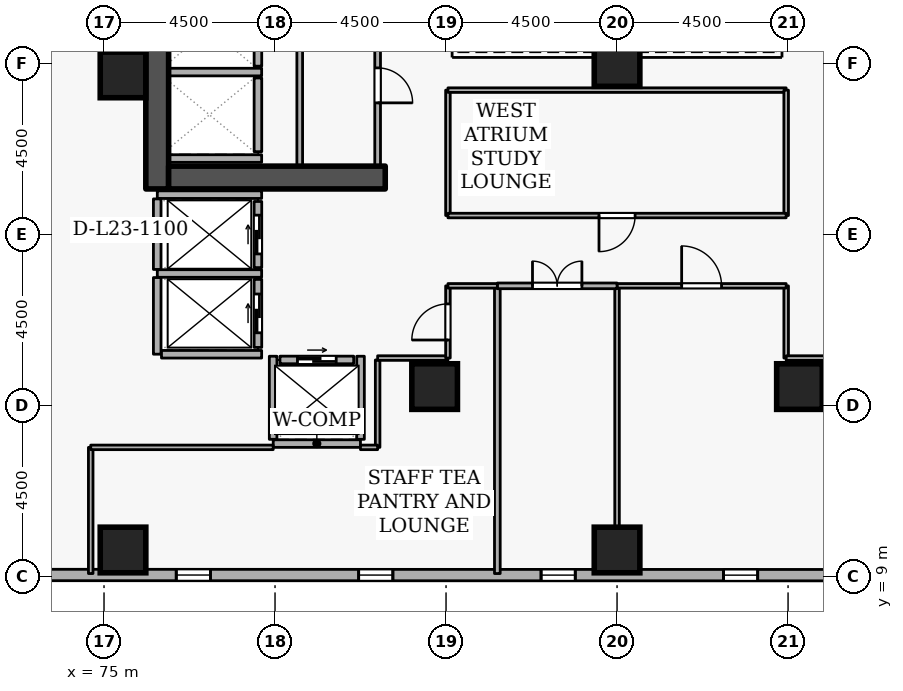
"""IFC4 building model, lengths in metres.
Left out: names, types, materials, properties, quantities, classifications, styles, units other than length and angle.
Written with IfcOpenShell. Run it as: python <this file> out.ifc"""

import sys

from ifc_helpers import new_model, si_unit, direction, frame, frame_2d, origin, origin_2d, place, context, subcontext, project, spatial, rectangle, extrude, element, fill, save


model = new_model("IFC4")
c1 = context("Model", 3, precision=1e-05, world=origin(), true_north=direction((0.0, 1.0)))
c2 = subcontext(c1, "Body", "Model", "MODEL_VIEW")
j1 = project(units=[si_unit("LENGTHUNIT", "METRE"), si_unit("PLANEANGLEUNIT", "RADIAN")], contexts=[c1])
p1 = place(None, origin())
s1 = spatial("IfcSite", under=j1, at=p1, CompositionType="ELEMENT")
p2 = place(p1, origin())
s2 = spatial("IfcBuilding", under=s1, at=p2, CompositionType="ELEMENT")
p3 = place(p2, frame((0.0, 0.0, 90.9)))
s3 = spatial("IfcBuildingStorey", under=s2, at=p3, CompositionType="ELEMENT", Elevation=90.9)
p4 = place(p3, frame((76.4, 19.2, 0.0), z_axis=(0.0, 0.0, 1.0), x_axis=(0.0, 1.0, 0.0)))
e1 = element("IfcWall", 1, at=p4, inside=s3, PredefinedType="SHEAR", context=c2, shape_type="SweptSolid", body=[
    extrude(rectangle(XDim=15.6, YDim=0.6, at=frame_2d((7.8, 0.0))), origin(), (0.0, 0.0, 1.0), 3.6),
])
p5 = place(p3, frame((76.7, 19.5, 0.0), z_axis=(0.0, 0.0, 1.0), x_axis=(1.0, 0.0, 0.0)))
e2 = element("IfcWall", 2, at=p5, inside=s3, PredefinedType="SHEAR", context=c2, shape_type="SweptSolid", body=[
    extrude(rectangle(XDim=5.7, YDim=0.6, at=frame_2d((2.85, 0.0))), origin(), (0.0, 0.0, 1.0), 3.6),
])
for number, where, z_axis, x_axis in (
    (3, (88.5, 9.7, 0.0), (0.0, 0.0, 1.0), (1.0, 0.0, 0.0)),
    (4, (75.5, 9.7, 0.0), (0.0, 0.0, 1.0), (1.0, 0.0, 0.0)),
    (5, (93.3, 14.0, 0.0), (0.0, 0.0, 1.0), (1.0, 0.0, 0.0)),
    (6, (83.7, 14.0, 0.0), (0.0, 0.0, 1.0), (1.0, 0.0, 0.0)),
    (7, (75.5, 22.2, 0.0), (0.0, 0.0, 1.0), (1.0, 0.0, 0.0)),
    (8, (88.5, 22.5, 0.0), (0.0, 0.0, 1.0), (1.0, 0.0, 0.0)),
):
    element("IfcColumn", number, at=place(p3, frame(where, z_axis=z_axis, x_axis=x_axis)), inside=s3, PredefinedType="COLUMN", context=c2, shape_type="SweptSolid", body=[
        extrude(rectangle(XDim=1.2, YDim=1.2, at=origin_2d()), origin(), (0.0, 0.0, 1.0), 3.6),
    ])
p6 = place(p3, frame((69.401, 9.043, 0.0), z_axis=(0.0, 0.0, 1.0), x_axis=(0.99999997744, -0.000212414941, 0.0)))
e9 = element("IfcWall", 9, at=p6, inside=s3, PredefinedType="STANDARD", context=c2, shape_type="SweptSolid", body=[
    extrude(rectangle(XDim=34.481, YDim=0.3, at=frame_2d((17.24, 0.0))), origin(), (0.0, 0.0, 1.0), 2.7),
])
p7 = place(p6, frame((7.5, 0.0, 0.72)))
e10 = element("IfcOpeningElement", 10, at=p7, cuts=e9, PredefinedType="OPENING", context=c2, shape_type="SweptSolid", body=[
    extrude(rectangle(XDim=0.9, YDim=1.75, at=frame_2d((0.45, 0.875))), frame((0.0, 0.16, 0.0), z_axis=(0.0, -1.0, 0.0), x_axis=(1.0, 0.0, 0.0)), (0.0, 0.0, 1.0), 0.32),
])
p8 = place(p6, frame((12.3, 0.0, 0.72)))
e11 = element("IfcOpeningElement", 11, at=p8, cuts=e9, PredefinedType="OPENING", context=c2, shape_type="SweptSolid", body=[
    extrude(rectangle(XDim=0.9, YDim=1.75, at=frame_2d((0.45, 0.875))), frame((0.0, 0.16, 0.0), z_axis=(0.0, -1.0, 0.0), x_axis=(1.0, 0.0, 0.0)), (0.0, 0.0, 1.0), 0.32),
])
p9 = place(p6, frame((17.1, 0.0, 0.72)))
e12 = element("IfcOpeningElement", 12, at=p9, cuts=e9, PredefinedType="OPENING", context=c2, shape_type="SweptSolid", body=[
    extrude(rectangle(XDim=0.9, YDim=1.75, at=frame_2d((0.45, 0.875))), frame((0.0, 0.16, 0.0), z_axis=(0.0, -1.0, 0.0), x_axis=(1.0, 0.0, 0.0)), (0.0, 0.0, 1.0), 0.32),
])
p10 = place(p6, frame((21.9, 0.0, 0.72)))
e13 = element("IfcOpeningElement", 13, at=p10, cuts=e9, PredefinedType="OPENING", context=c2, shape_type="SweptSolid", body=[
    extrude(rectangle(XDim=0.9, YDim=1.75, at=frame_2d((0.45, 0.875))), frame((0.0, 0.16, 0.0), z_axis=(0.0, -1.0, 0.0), x_axis=(1.0, 0.0, 0.0)), (0.0, 0.0, 1.0), 0.32),
])
p11 = place(p6, frame((26.7, 0.0, 0.72)))
e14 = element("IfcOpeningElement", 14, at=p11, cuts=e9, PredefinedType="OPENING", context=c2, shape_type="SweptSolid", body=[
    extrude(rectangle(XDim=0.9, YDim=1.75, at=frame_2d((0.45, 0.875))), frame((0.0, 0.16, 0.0), z_axis=(0.0, -1.0, 0.0), x_axis=(1.0, 0.0, 0.0)), (0.0, 0.0, 1.0), 0.32),
])
p12 = place(p3, frame((79.05, 22.43, 0.0), z_axis=(0.0, 0.0, 1.0), x_axis=(0.0, 1.0, 0.0)))
e15 = element("IfcWall", 15, at=p12, inside=s3, PredefinedType="STANDARD", context=c2, shape_type="SweptSolid", body=[
    extrude(rectangle(XDim=1.99, YDim=0.2, at=frame_2d((0.995, 0.0))), origin(), (0.0, 0.0, 1.0), 3.34),
])
p13 = place(p3, frame((79.05, 20.18, 0.0), z_axis=(0.0, 0.0, 1.0), x_axis=(0.0, 1.0, 0.0)))
e16 = element("IfcWall", 16, at=p13, inside=s3, PredefinedType="STANDARD", context=c2, shape_type="SweptSolid", body=[
    extrude(rectangle(XDim=1.94, YDim=0.2, at=frame_2d((0.97, 0.0))), origin(), (0.0, 0.0, 1.0), 3.34),
])
p14 = place(p3, frame((79.05, 17.13, 0.0), z_axis=(0.0, 0.0, 1.0), x_axis=(0.0, 1.0, 0.0)))
e17 = element("IfcWall", 17, at=p14, inside=s3, PredefinedType="STANDARD", context=c2, shape_type="SweptSolid", body=[
    extrude(rectangle(XDim=1.74, YDim=0.2, at=frame_2d((0.87, 0.0))), origin(), (0.0, 0.0, 1.0), 3.34),
])
p15 = place(p14, frame((0.36, 0.0, 0.0)))
e18 = element("IfcOpeningElement", 18, at=p15, cuts=e17, PredefinedType="OPENING", context=c2, shape_type="SweptSolid", body=[
    extrude(rectangle(XDim=1.02, YDim=2.06, at=frame_2d((0.51, 1.03))), frame((0.0, 0.11, 0.0), z_axis=(0.0, -1.0, 0.0), x_axis=(1.0, 0.0, 0.0)), (0.0, 0.0, 1.0), 0.22),
])
p16 = place(p3, frame((79.05, 15.03, 0.0), z_axis=(0.0, 0.0, 1.0), x_axis=(0.0, 1.0, 0.0)))
e19 = element("IfcWall", 19, at=p16, inside=s3, PredefinedType="STANDARD", context=c2, shape_type="SweptSolid", body=[
    extrude(rectangle(XDim=1.79, YDim=0.2, at=frame_2d((0.895, 0.0))), origin(), (0.0, 0.0, 1.0), 3.34),
])
p17 = place(p16, frame((0.385, 0.0, 0.0)))
e20 = element("IfcOpeningElement", 20, at=p17, cuts=e19, PredefinedType="OPENING", context=c2, shape_type="SweptSolid", body=[
    extrude(rectangle(XDim=1.02, YDim=2.06, at=frame_2d((0.51, 1.03))), frame((0.0, 0.11, 0.0), z_axis=(0.0, -1.0, 0.0), x_axis=(1.0, 0.0, 0.0)), (0.0, 0.0, 1.0), 0.22),
])
p18 = place(p3, frame((79.63, 14.7, 0.0), z_axis=(0.0, 0.0, 1.0), x_axis=(1.0, 0.0, 0.0)))
e21 = element("IfcWall", 21, at=p18, inside=s3, PredefinedType="STANDARD", context=c2, shape_type="SweptSolid", body=[
    extrude(rectangle(XDim=1.94, YDim=0.2, at=frame_2d((0.97, 0.0))), origin(), (0.0, 0.0, 1.0), 3.34),
])
p19 = place(p18, frame((0.46, 0.0, 0.0)))
e22 = element("IfcOpeningElement", 22, at=p19, cuts=e21, PredefinedType="OPENING", context=c2, shape_type="SweptSolid", body=[
    extrude(rectangle(XDim=1.02, YDim=2.06, at=frame_2d((0.51, 1.03))), frame((0.0, 0.11, 0.0), z_axis=(0.0, -1.0, 0.0), x_axis=(1.0, 0.0, 0.0)), (0.0, 0.0, 1.0), 0.22),
])
for number, where, z_axis, x_axis in (
    (23, (76.712, 22.275, 0.0), (0.0, 0.0, 1.0), (1.0, 0.0, 0.0)),
    (24, (76.712, 20.0, 0.0), (0.0, 0.0, 1.0), (1.0, 0.0, 0.0)),
):
    element("IfcWall", number, at=place(p3, frame(where, z_axis=z_axis, x_axis=x_axis)), inside=s3, PredefinedType="STANDARD", context=c2, shape_type="SweptSolid", body=[
        extrude(rectangle(XDim=2.436, YDim=0.2, at=frame_2d((1.218, 0.0))), origin(), (0.0, 0.0, 1.0), 3.34),
    ])
p20 = place(p3, frame((76.402, 19.05, 0.0), z_axis=(0.0, 0.0, 1.0), x_axis=(1.0, 0.0, 0.0)))
e25 = element("IfcWall", 25, at=p20, inside=s3, PredefinedType="STANDARD", context=c2, shape_type="SweptSolid", body=[
    extrude(rectangle(XDim=2.746, YDim=0.2, at=frame_2d((1.373, 0.0))), origin(), (0.0, 0.0, 1.0), 2.545),
])
p21 = place(p3, frame((76.402, 16.975, 0.0), z_axis=(0.0, 0.0, 1.0), x_axis=(1.0, 0.0, 0.0)))
e26 = element("IfcWall", 26, at=p21, inside=s3, PredefinedType="STANDARD", context=c2, shape_type="SweptSolid", body=[
    extrude(rectangle(XDim=2.746, YDim=0.2, at=frame_2d((1.373, 0.0))), origin(), (0.0, 0.0, 1.0), 3.34),
])
p22 = place(p3, frame((76.4, 14.852, 0.0), z_axis=(0.0, 0.0, 1.0), x_axis=(0.0, 1.0, 0.0)))
e27 = element("IfcWall", 27, at=p22, inside=s3, PredefinedType="STANDARD", context=c2, shape_type="SweptSolid", body=[
    extrude(rectangle(XDim=2.016, YDim=0.2, at=frame_2d((1.008, 0.0))), origin(), (0.0, 0.0, 1.0), 3.34),
])
p23 = place(p3, frame((76.4, 17.082, 0.0), z_axis=(0.0, 0.0, 1.0), x_axis=(0.0, 1.0, 0.0)))
e28 = element("IfcWall", 28, at=p23, inside=s3, PredefinedType="STANDARD", context=c2, shape_type="SweptSolid", body=[
    extrude(rectangle(XDim=1.856, YDim=0.2, at=frame_2d((0.928, 0.0))), origin(), (0.0, 0.0, 1.0), 3.34),
])
p24 = place(p3, frame((76.512, 14.85, 0.0), z_axis=(0.0, 0.0, 1.0), x_axis=(1.0, 0.0, 0.0)))
e29 = element("IfcWall", 29, at=p24, inside=s3, PredefinedType="STANDARD", context=c2, shape_type="SweptSolid", body=[
    extrude(rectangle(XDim=2.636, YDim=0.2, at=frame_2d((1.318, 0.0))), origin(), (0.0, 0.0, 1.0), 3.34),
])
p25 = place(p3, frame((79.452, 12.5, 0.0), z_axis=(0.0, 0.0, 1.0), x_axis=(1.0, 0.0, 0.0)))
e30 = element("IfcWall", 30, at=p25, inside=s3, PredefinedType="STANDARD", context=c2, shape_type="SweptSolid", body=[
    extrude(rectangle(XDim=2.296, YDim=0.2, at=frame_2d((1.148, 0.0))), origin(), (0.0, 0.0, 1.0), 3.34),
])
for number, where, z_axis, x_axis in (
    (31, (81.75, 12.612, 0.0), (0.0, 0.0, 1.0), (0.0, 1.0, 0.0)),
    (32, (79.45, 12.612, 0.0), (0.0, 0.0, 1.0), (0.0, 1.0, 0.0)),
):
    element("IfcWall", number, at=place(p3, frame(where, z_axis=z_axis, x_axis=x_axis)), inside=s3, PredefinedType="STANDARD", context=c2, shape_type="SweptSolid", body=[
        extrude(rectangle(XDim=2.186, YDim=0.2, at=frame_2d((1.093, 0.0))), origin(), (0.0, 0.0, 1.0), 3.34),
    ])
p26 = place(p3, frame((80.15, 19.8, 0.0), z_axis=(0.0, 0.0, 1.0), x_axis=(0.0, 1.0, 0.0)))
e33 = element("IfcWall", 33, at=p26, inside=s3, PredefinedType="PARTITIONING", context=c2, shape_type="SweptSolid", body=[
    extrude(rectangle(XDim=4.25, YDim=0.15, at=frame_2d((2.125, 0.0))), origin(), (0.0, 0.0, 1.0), 3.34),
])
p27 = place(p3, frame((82.2, 24.05, 0.0), z_axis=(0.0, 0.0, 1.0), x_axis=(0.0, -1.0, 0.0)))
e34 = element("IfcWall", 34, at=p27, inside=s3, PredefinedType="PARTITIONING", context=c2, shape_type="SweptSolid", body=[
    extrude(rectangle(XDim=4.25, YDim=0.15, at=frame_2d((2.125, 0.0))), origin(), (0.0, 0.0, 1.0), 3.34),
])
p28 = place(p27, frame((1.665, 0.0, 0.0)))
e35 = element("IfcOpeningElement", 35, at=p28, cuts=e34, PredefinedType="OPENING", context=c2, shape_type="SweptSolid", body=[
    extrude(rectangle(XDim=0.92, YDim=2.08, at=frame_2d((0.46, 1.04))), frame((0.0, 0.085, 0.0), z_axis=(0.0, -1.0, 0.0), x_axis=(1.0, 0.0, 0.0)), (0.0, 0.0, 1.0), 0.17),
])
p29 = place(p3, frame((92.95, 16.65, 0.0), z_axis=(0.0, 0.0, 1.0), x_axis=(0.0, -1.0, 0.0)))
e36 = element("IfcWall", 36, at=p29, inside=s3, PredefinedType="PARTITIONING", context=c2, shape_type="SweptSolid", body=[
    extrude(rectangle(XDim=1.9, YDim=0.12, at=frame_2d((0.95, 0.0))), origin(), (0.0, 0.0, 1.0), 3.34),
])
p30 = place(p3, frame((92.95, 14.75, 0.0), z_axis=(0.0, 0.0, 1.0), x_axis=(1.0, 0.0, 0.0)))
e37 = element("IfcWall", 37, at=p30, inside=s3, PredefinedType="PARTITIONING", context=c2, shape_type="SweptSolid", body=[
    extrude(rectangle(XDim=1.85, YDim=0.12, at=frame_2d((0.925, 0.0))), origin(), (0.0, 0.0, 1.0), 3.34),
])
p31 = place(p3, frame((88.5, 9.7, 0.0), z_axis=(0.0, 0.0, 1.0), x_axis=(0.0, 1.0, 0.0)))
e38 = element("IfcWall", 38, at=p31, inside=s3, PredefinedType="PARTITIONING", context=c2, shape_type="SweptSolid", body=[
    extrude(rectangle(XDim=6.95, YDim=0.12, at=frame_2d((3.475, 0.0))), origin(), (0.0, 0.0, 1.0), 2.932),
])
p32 = place(p3, frame((88.5, 16.65, 0.0), z_axis=(0.0, 0.0, 1.0), x_axis=(1.0, 0.0, 0.0)))
e39 = element("IfcWall", 39, at=p32, inside=s3, PredefinedType="PARTITIONING", context=c2, shape_type="SweptSolid", body=[
    extrude(rectangle(XDim=4.45, YDim=0.12, at=frame_2d((2.225, 0.0))), origin(), (0.0, 0.0, 1.0), 3.34),
])
p33 = place(p32, frame((1.7, 0.0, 0.0)))
e40 = element("IfcOpeningElement", 40, at=p33, cuts=e39, PredefinedType="OPENING", context=c2, shape_type="SweptSolid", body=[
    extrude(rectangle(XDim=1.05, YDim=2.1, at=frame_2d((0.525, 1.05))), frame((0.0, 0.07, 0.0), z_axis=(0.0, -1.0, 0.0), x_axis=(1.0, 0.0, 0.0)), (0.0, 0.0, 1.0), 0.14),
])
p34 = place(p3, frame((85.35, 9.08, 0.0), z_axis=(0.0, 0.0, 1.0), x_axis=(0.0, 1.0, 0.0)))
e41 = element("IfcWall", 41, at=p34, inside=s3, PredefinedType="PARTITIONING", context=c2, shape_type="SweptSolid", body=[
    extrude(rectangle(XDim=7.57, YDim=0.15, at=frame_2d((3.785, 0.0))), origin(), (0.0, 0.0, 1.0), 3.34),
])
p35 = place(p3, frame((85.35, 16.65, 0.0), z_axis=(0.0, 0.0, 1.0), x_axis=(1.0, 0.0, 0.0)))
e42 = element("IfcWall", 42, at=p35, inside=s3, PredefinedType="PARTITIONING", context=c2, shape_type="SweptSolid", body=[
    extrude(rectangle(XDim=3.15, YDim=0.15, at=frame_2d((1.575, 0.0))), origin(), (0.0, 0.0, 1.0), 3.34),
])
p36 = place(p35, frame((0.925, 0.0, 0.0)))
e43 = element("IfcOpeningElement", 43, at=p36, cuts=e42, PredefinedType="OPENING", context=c2, shape_type="SweptSolid", body=[
    extrude(rectangle(XDim=1.3, YDim=2.12, at=frame_2d((0.65, 1.06))), frame((0.0, 0.085, 0.0), z_axis=(0.0, -1.0, 0.0), x_axis=(1.0, 0.0, 0.0)), (0.0, 0.0, 1.0), 0.17),
])
p37 = place(p3, frame((82.2, 12.4, 0.0), z_axis=(0.0, 0.0, 1.0), x_axis=(0.0, 1.0, 0.0)))
e44 = element("IfcWall", 44, at=p37, inside=s3, PredefinedType="PARTITIONING", context=c2, shape_type="SweptSolid", body=[
    extrude(rectangle(XDim=2.3, YDim=0.12, at=frame_2d((1.15, 0.0))), origin(), (0.0, 0.0, 1.0), 3.34),
])
p38 = place(p3, frame((82.2, 14.75, 0.0), z_axis=(0.0, 0.0, 1.0), x_axis=(1.0, 0.0, 0.0)))
e45 = element("IfcWall", 45, at=p38, inside=s3, PredefinedType="PARTITIONING", context=c2, shape_type="SweptSolid", body=[
    extrude(rectangle(XDim=1.85, YDim=0.12, at=frame_2d((0.925, 0.0))), origin(), (0.0, 0.0, 1.0), 3.34),
])
p39 = place(p3, frame((84.05, 14.75, 0.0), z_axis=(0.0, 0.0, 1.0), x_axis=(0.0, 1.0, 0.0)))
e46 = element("IfcWall", 46, at=p39, inside=s3, PredefinedType="PARTITIONING", context=c2, shape_type="SweptSolid", body=[
    extrude(rectangle(XDim=1.9, YDim=0.12, at=frame_2d((0.95, 0.0))), origin(), (0.0, 0.0, 1.0), 3.34),
])
p40 = place(p39, frame((0.475, 0.0, 0.0)))
e47 = element("IfcOpeningElement", 47, at=p40, cuts=e46, PredefinedType="OPENING", context=c2, shape_type="SweptSolid", body=[
    extrude(rectangle(XDim=0.95, YDim=2.1, at=frame_2d((0.475, 1.05))), frame((0.0, 0.07, 0.0), z_axis=(0.0, -1.0, 0.0), x_axis=(1.0, 0.0, 0.0)), (0.0, 0.0, 1.0), 0.14),
])
p41 = place(p3, frame((84.05, 16.65, 0.0), z_axis=(0.0, 0.0, 1.0), x_axis=(1.0, 0.0, 0.0)))
e48 = element("IfcWall", 48, at=p41, inside=s3, PredefinedType="PARTITIONING", context=c2, shape_type="SweptSolid", body=[
    extrude(rectangle(XDim=1.3, YDim=0.12, at=frame_2d((0.65, 0.0))), origin(), (0.0, 0.0, 1.0), 3.34),
])
p42 = place(p3, frame((74.65, 9.08, 0.0), z_axis=(0.0, 0.0, 1.0), x_axis=(0.0, 1.0, 0.0)))
e49 = element("IfcWall", 49, at=p42, inside=s3, PredefinedType="PARTITIONING", context=c2, shape_type="SweptSolid", body=[
    extrude(rectangle(XDim=3.32, YDim=0.12, at=frame_2d((1.66, 0.0))), origin(), (0.0, 0.0, 1.0), 3.34),
])
p43 = place(p3, frame((74.65, 12.4, 0.0), z_axis=(0.0, 0.0, 1.0), x_axis=(1.0, 0.0, 0.0)))
e50 = element("IfcWall", 50, at=p43, inside=s3, PredefinedType="PARTITIONING", context=c2, shape_type="SweptSolid", body=[
    extrude(rectangle(XDim=4.802, YDim=0.12, at=frame_2d((2.401, 0.0))), origin(), (0.0, 0.0, 1.0), 3.34),
])
p44 = place(p3, frame((81.748, 12.4, 0.0), z_axis=(0.0, 0.0, 1.0), x_axis=(1.0, 0.0, 0.0)))
e51 = element("IfcWall", 51, at=p44, inside=s3, PredefinedType="PARTITIONING", context=c2, shape_type="SweptSolid", body=[
    extrude(rectangle(XDim=0.452, YDim=0.12, at=frame_2d((0.226, 0.0))), origin(), (0.0, 0.0, 1.0), 3.34),
])
p45 = place(p3, frame((84.05, 18.5, 0.0), z_axis=(0.0, 0.0, 1.0), x_axis=(0.0, 1.0, 0.0)))
e52 = element("IfcWall", 52, at=p45, inside=s3, PredefinedType="PARTITIONING", context=c2, shape_type="SweptSolid", body=[
    extrude(rectangle(XDim=3.3, YDim=0.12, at=frame_2d((1.65, 0.0))), origin(), (0.0, 0.0, 1.0), 3.34),
])
p46 = place(p3, frame((84.05, 21.8, 0.0), z_axis=(0.0, 0.0, 1.0), x_axis=(1.0, 0.0, 0.0)))
e53 = element("IfcWall", 53, at=p46, inside=s3, PredefinedType="PARTITIONING", context=c2, shape_type="SweptSolid", body=[
    extrude(rectangle(XDim=8.9, YDim=0.12, at=frame_2d((4.45, 0.0))), origin(), (0.0, 0.0, 1.0), 3.34),
])
p47 = place(p3, frame((92.95, 21.8, 0.0), z_axis=(0.0, 0.0, 1.0), x_axis=(0.0, -1.0, 0.0)))
e54 = element("IfcWall", 54, at=p47, inside=s3, PredefinedType="PARTITIONING", context=c2, shape_type="SweptSolid", body=[
    extrude(rectangle(XDim=3.3, YDim=0.12, at=frame_2d((1.65, 0.0))), origin(), (0.0, 0.0, 1.0), 3.34),
])
p48 = place(p3, frame((92.95, 18.5, 0.0), z_axis=(0.0, 0.0, 1.0), x_axis=(-1.0, 0.0, 0.0)))
e55 = element("IfcWall", 55, at=p48, inside=s3, PredefinedType="PARTITIONING", context=c2, shape_type="SweptSolid", body=[
    extrude(rectangle(XDim=8.9, YDim=0.12, at=frame_2d((4.45, 0.0))), origin(), (0.0, 0.0, 1.0), 3.34),
])
p49 = place(p48, frame((3.975, 0.0, 0.0)))
e56 = element("IfcOpeningElement", 56, at=p49, cuts=e55, PredefinedType="OPENING", context=c2, shape_type="SweptSolid", body=[
    extrude(rectangle(XDim=0.95, YDim=2.1, at=frame_2d((0.475, 1.05))), frame((0.0, 0.07, 0.0), z_axis=(0.0, -1.0, 0.0), x_axis=(1.0, 0.0, 0.0)), (0.0, 0.0, 1.0), 0.14),
])
p50 = place(p7, origin())
e57 = element("IfcWindow", 57, at=p50, inside=s3, PartitioningType="SINGLE_PANEL", PredefinedType="WINDOW", context=c2, shape_type="SweptSolid", body=[
    extrude(rectangle(XDim=0.9, YDim=1.75, at=frame_2d((0.45, 0.875))), frame((0.0, 0.03, 0.0), z_axis=(0.0, -1.0, 0.0), x_axis=(1.0, 0.0, 0.0)), (0.0, 0.0, 1.0), 0.06),
])
fill(e10, e57)
p51 = place(p8, origin())
e58 = element("IfcWindow", 58, at=p51, inside=s3, PartitioningType="SINGLE_PANEL", PredefinedType="WINDOW", context=c2, shape_type="SweptSolid", body=[
    extrude(rectangle(XDim=0.9, YDim=1.75, at=frame_2d((0.45, 0.875))), frame((0.0, 0.03, 0.0), z_axis=(0.0, -1.0, 0.0), x_axis=(1.0, 0.0, 0.0)), (0.0, 0.0, 1.0), 0.06),
])
fill(e11, e58)
p52 = place(p9, origin())
e59 = element("IfcWindow", 59, at=p52, inside=s3, PartitioningType="SINGLE_PANEL", PredefinedType="WINDOW", context=c2, shape_type="SweptSolid", body=[
    extrude(rectangle(XDim=0.9, YDim=1.75, at=frame_2d((0.45, 0.875))), frame((0.0, 0.03, 0.0), z_axis=(0.0, -1.0, 0.0), x_axis=(1.0, 0.0, 0.0)), (0.0, 0.0, 1.0), 0.06),
])
fill(e12, e59)
p53 = place(p10, origin())
e60 = element("IfcWindow", 60, at=p53, inside=s3, PartitioningType="SINGLE_PANEL", PredefinedType="WINDOW", context=c2, shape_type="SweptSolid", body=[
    extrude(rectangle(XDim=0.9, YDim=1.75, at=frame_2d((0.45, 0.875))), frame((0.0, 0.03, 0.0), z_axis=(0.0, -1.0, 0.0), x_axis=(1.0, 0.0, 0.0)), (0.0, 0.0, 1.0), 0.06),
])
fill(e13, e60)
p54 = place(p15, origin())
e61 = element("IfcDoor", 61, at=p54, inside=s3, OperationType="SLIDING_TO_LEFT", PredefinedType="DOOR", context=c2, shape_type="SweptSolid", body=[
    extrude(rectangle(XDim=1.02, YDim=2.06, at=frame_2d((0.51, 1.03))), frame((0.0, 0.025, 0.0), z_axis=(0.0, -1.0, 0.0), x_axis=(1.0, 0.0, 0.0)), (0.0, 0.0, 1.0), 0.05),
])
fill(e18, e61)
p55 = place(p17, origin())
e62 = element("IfcDoor", 62, at=p55, inside=s3, OperationType="SLIDING_TO_LEFT", PredefinedType="DOOR", context=c2, shape_type="SweptSolid", body=[
    extrude(rectangle(XDim=1.02, YDim=2.06, at=frame_2d((0.51, 1.03))), frame((0.0, 0.025, 0.0), z_axis=(0.0, -1.0, 0.0), x_axis=(1.0, 0.0, 0.0)), (0.0, 0.0, 1.0), 0.05),
])
fill(e20, e62)
p56 = place(p19, origin())
e63 = element("IfcDoor", 63, at=p56, inside=s3, OperationType="SLIDING_TO_LEFT", PredefinedType="DOOR", context=c2, shape_type="SweptSolid", body=[
    extrude(rectangle(XDim=1.02, YDim=2.06, at=frame_2d((0.51, 1.03))), frame((0.0, 0.025, 0.0), z_axis=(0.0, -1.0, 0.0), x_axis=(1.0, 0.0, 0.0)), (0.0, 0.0, 1.0), 0.05),
])
fill(e22, e63)
p57 = place(p28, origin())
e64 = element("IfcDoor", 64, at=p57, inside=s3, OperationType="SINGLE_SWING_RIGHT", PredefinedType="DOOR", context=c2, shape_type="SweptSolid", body=[
    extrude(rectangle(XDim=0.92, YDim=2.08, at=frame_2d((0.46, 1.04))), frame((0.0, 0.025, 0.0), z_axis=(0.0, -1.0, 0.0), x_axis=(1.0, 0.0, 0.0)), (0.0, 0.0, 1.0), 0.05),
])
fill(e35, e64)
p58 = place(p33, origin())
e65 = element("IfcDoor", 65, at=p58, inside=s3, OperationType="SINGLE_SWING_LEFT", PredefinedType="DOOR", context=c2, shape_type="SweptSolid", body=[
    extrude(rectangle(XDim=1.05, YDim=2.1, at=frame_2d((0.525, 1.05))), frame((0.0, 0.025, 0.0), z_axis=(0.0, -1.0, 0.0), x_axis=(1.0, 0.0, 0.0)), (0.0, 0.0, 1.0), 0.05),
])
fill(e40, e65)
p59 = place(p36, origin())
e66 = element("IfcDoor", 66, at=p59, inside=s3, OperationType="DOUBLE_DOOR_SINGLE_SWING", PredefinedType="DOOR", context=c2, shape_type="SweptSolid", body=[
    extrude(rectangle(XDim=1.3, YDim=2.12, at=frame_2d((0.65, 1.06))), frame((0.0, 0.025, 0.0), z_axis=(0.0, -1.0, 0.0), x_axis=(1.0, 0.0, 0.0)), (0.0, 0.0, 1.0), 0.05),
])
fill(e43, e66)
p60 = place(p40, origin())
e67 = element("IfcDoor", 67, at=p60, inside=s3, OperationType="SINGLE_SWING_LEFT", PredefinedType="DOOR", context=c2, shape_type="SweptSolid", body=[
    extrude(rectangle(XDim=0.95, YDim=2.1, at=frame_2d((0.475, 1.05))), frame((0.0, 0.025, 0.0), z_axis=(0.0, -1.0, 0.0), x_axis=(1.0, 0.0, 0.0)), (0.0, 0.0, 1.0), 0.05),
])
fill(e47, e67)
p61 = place(p49, origin())
e68 = element("IfcDoor", 68, at=p61, inside=s3, OperationType="SINGLE_SWING_RIGHT", PredefinedType="DOOR", context=c2, shape_type="SweptSolid", body=[
    extrude(rectangle(XDim=0.95, YDim=2.1, at=frame_2d((0.475, 1.05))), frame((0.0, 0.025, 0.0), z_axis=(0.0, -1.0, 0.0), x_axis=(1.0, 0.0, 0.0)), (0.0, 0.0, 1.0), 0.05),
])
fill(e56, e68)
save(model, sys.argv[1])
